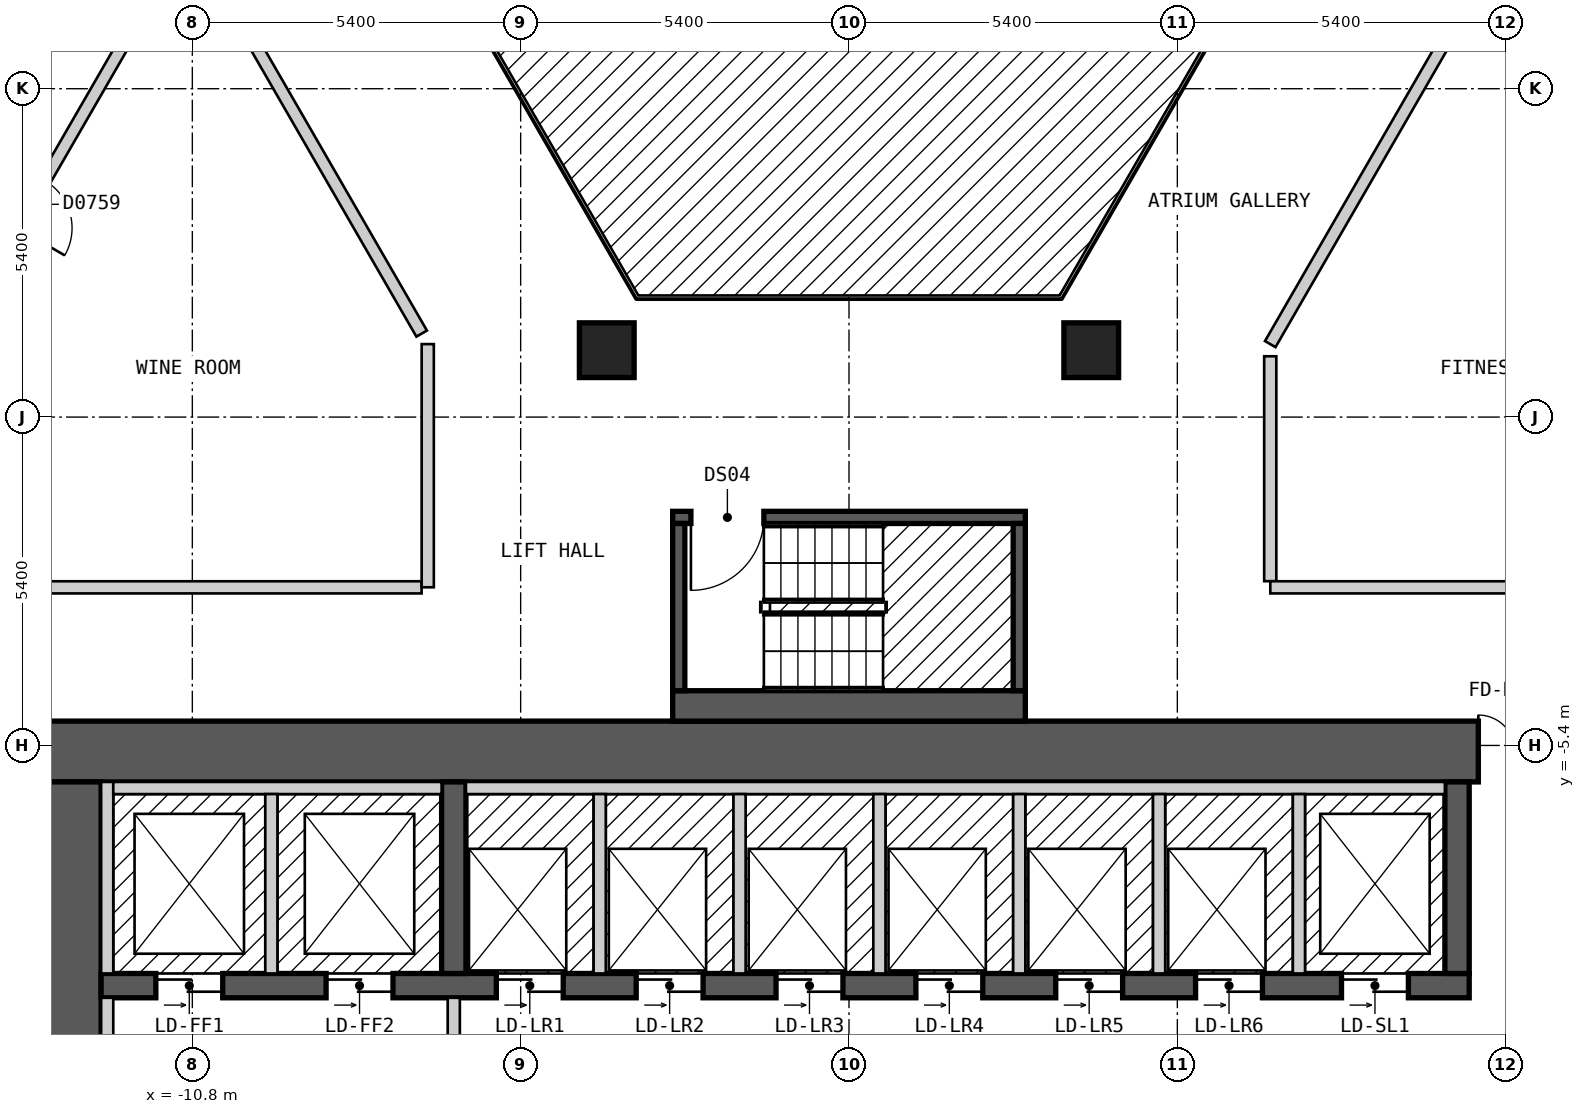
"""IFC4 building model, lengths in metres.
Left out: names, types, materials, properties, quantities, classifications, styles, units other than length and angle.
Written with IfcOpenShell. Run it as: python <this file> out.ifc"""

import sys

from ifc_helpers import new_model, si_unit, direction, frame, frame_2d, origin, origin_2d, place, context, subcontext, project, spatial, rectangle, extrude, element, fill, save


model = new_model("IFC4")
c1 = context("Model", 3, precision=1e-05, world=origin(), true_north=direction((0.0, 1.0)))
c2 = subcontext(c1, "Body", "Model", "MODEL_VIEW")
j1 = project(units=[si_unit("LENGTHUNIT", "METRE"), si_unit("PLANEANGLEUNIT", "RADIAN")], contexts=[c1])
p1 = place(None, origin())
s1 = spatial("IfcSite", under=j1, at=p1, CompositionType="ELEMENT")
p2 = place(p1, origin())
s2 = spatial("IfcBuilding", under=s1, at=p2, CompositionType="ELEMENT")
p3 = place(p2, frame((0.0, 0.0, 105.0)))
s3 = spatial("IfcBuildingStorey", under=s2, at=p3, CompositionType="ELEMENT", Elevation=105.0)
for number, where, z_axis, x_axis in (
    (1, (3.984, 1.1, 0.0), (0.0, 0.0, 1.0), (1.0, 0.0, 0.0)),
    (2, (-3.984, 1.1, 0.0), (0.0, 0.0, 1.0), (1.0, 0.0, 0.0)),
):
    element("IfcColumn", number, at=place(p3, frame(where, z_axis=z_axis, x_axis=x_axis)), inside=s3, PredefinedType="COLUMN", context=c2, shape_type="SweptSolid", body=[
        extrude(rectangle(XDim=0.9, YDim=0.9, at=origin_2d()), origin(), (0.0, 0.0, 1.0), 3.0),
    ])
p4 = place(p3, frame((-13.3, -5.5, 0.0), z_axis=(0.0, 0.0, 1.0), x_axis=(1.0, 0.0, 0.0)))
e3 = element("IfcWall", 3, at=p4, inside=s3, PredefinedType="SHEAR", context=c2, shape_type="SweptSolid", body=[
    extrude(rectangle(XDim=26.6, YDim=1.0, at=frame_2d((13.3, 0.0))), origin(), (0.0, 0.0, 1.0), 2.6),
])
p5 = place(p4, frame((23.65, 0.0, 0.0)))
e4 = element("IfcOpeningElement", 4, at=p5, cuts=e3, PredefinedType="OPENING", context=c2, shape_type="SweptSolid", body=[
    extrude(rectangle(XDim=1.2, YDim=2.1, at=frame_2d((0.6, 1.05))), frame((0.0, 0.51, 0.0), z_axis=(0.0, -1.0, 0.0), x_axis=(1.0, 0.0, 0.0)), (0.0, 0.0, 1.0), 1.02),
])
p6 = place(p3, frame((-12.8, -18.0, 0.0), z_axis=(0.0, 0.0, 1.0), x_axis=(0.0, 1.0, 0.0)))
e5 = element("IfcWall", 5, at=p6, inside=s3, PredefinedType="SHEAR", context=c2, shape_type="SweptSolid", body=[
    extrude(rectangle(XDim=12.0, YDim=1.0, at=frame_2d((6.0, 0.0))), origin(), (0.0, 0.0, 1.0), 2.6),
])
p7 = place(p6, frame((3.8, 0.0, 0.0)))
e6 = element("IfcOpeningElement", 6, at=p7, cuts=e5, PredefinedType="OPENING", context=c2, shape_type="SweptSolid", body=[
    extrude(rectangle(XDim=1.2, YDim=2.1, at=frame_2d((0.6, 1.05))), frame((0.0, 0.51, 0.0), z_axis=(0.0, -1.0, 0.0), x_axis=(1.0, 0.0, 0.0)), (0.0, 0.0, 1.0), 1.02),
])
p8 = place(p3, frame((-12.3, -9.35, 0.0), z_axis=(0.0, 0.0, 1.0), x_axis=(1.0, 0.0, 0.0)))
e7 = element("IfcWall", 7, at=p8, inside=s3, PredefinedType="SHEAR", context=c2, shape_type="SweptSolid", body=[
    extrude(rectangle(XDim=22.5, YDim=0.4, at=frame_2d((11.25, 0.0))), origin(), (0.0, 0.0, 1.0), 2.6),
])
p9 = place(p8, frame((0.9, 0.0, 0.0)))
e8 = element("IfcOpeningElement", 8, at=p9, cuts=e7, PredefinedType="OPENING", context=c2, shape_type="SweptSolid", body=[
    extrude(rectangle(XDim=1.1, YDim=2.1, at=frame_2d((0.55, 1.05))), frame((0.0, 0.21, 0.0), z_axis=(0.0, -1.0, 0.0), x_axis=(1.0, 0.0, 0.0)), (0.0, 0.0, 1.0), 0.42),
])
p10 = place(p8, frame((3.7, 0.0, 0.0)))
e9 = element("IfcOpeningElement", 9, at=p10, cuts=e7, PredefinedType="OPENING", context=c2, shape_type="SweptSolid", body=[
    extrude(rectangle(XDim=1.1, YDim=2.1, at=frame_2d((0.55, 1.05))), frame((0.0, 0.21, 0.0), z_axis=(0.0, -1.0, 0.0), x_axis=(1.0, 0.0, 0.0)), (0.0, 0.0, 1.0), 0.42),
])
p11 = place(p8, frame((6.5, 0.0, 0.0)))
e10 = element("IfcOpeningElement", 10, at=p11, cuts=e7, PredefinedType="OPENING", context=c2, shape_type="SweptSolid", body=[
    extrude(rectangle(XDim=1.1, YDim=2.1, at=frame_2d((0.55, 1.05))), frame((0.0, 0.21, 0.0), z_axis=(0.0, -1.0, 0.0), x_axis=(1.0, 0.0, 0.0)), (0.0, 0.0, 1.0), 0.42),
])
p12 = place(p8, frame((8.8, 0.0, 0.0)))
e11 = element("IfcOpeningElement", 11, at=p12, cuts=e7, PredefinedType="OPENING", context=c2, shape_type="SweptSolid", body=[
    extrude(rectangle(XDim=1.1, YDim=2.1, at=frame_2d((0.55, 1.05))), frame((0.0, 0.21, 0.0), z_axis=(0.0, -1.0, 0.0), x_axis=(1.0, 0.0, 0.0)), (0.0, 0.0, 1.0), 0.42),
])
p13 = place(p8, frame((11.1, 0.0, 0.0)))
e12 = element("IfcOpeningElement", 12, at=p13, cuts=e7, PredefinedType="OPENING", context=c2, shape_type="SweptSolid", body=[
    extrude(rectangle(XDim=1.1, YDim=2.1, at=frame_2d((0.55, 1.05))), frame((0.0, 0.21, 0.0), z_axis=(0.0, -1.0, 0.0), x_axis=(1.0, 0.0, 0.0)), (0.0, 0.0, 1.0), 0.42),
])
p14 = place(p8, frame((13.4, 0.0, 0.0)))
e13 = element("IfcOpeningElement", 13, at=p14, cuts=e7, PredefinedType="OPENING", context=c2, shape_type="SweptSolid", body=[
    extrude(rectangle(XDim=1.1, YDim=2.1, at=frame_2d((0.55, 1.05))), frame((0.0, 0.21, 0.0), z_axis=(0.0, -1.0, 0.0), x_axis=(1.0, 0.0, 0.0)), (0.0, 0.0, 1.0), 0.42),
])
p15 = place(p8, frame((15.7, 0.0, 0.0)))
e14 = element("IfcOpeningElement", 14, at=p15, cuts=e7, PredefinedType="OPENING", context=c2, shape_type="SweptSolid", body=[
    extrude(rectangle(XDim=1.1, YDim=2.1, at=frame_2d((0.55, 1.05))), frame((0.0, 0.21, 0.0), z_axis=(0.0, -1.0, 0.0), x_axis=(1.0, 0.0, 0.0)), (0.0, 0.0, 1.0), 0.42),
])
p16 = place(p8, frame((18.0, 0.0, 0.0)))
e15 = element("IfcOpeningElement", 15, at=p16, cuts=e7, PredefinedType="OPENING", context=c2, shape_type="SweptSolid", body=[
    extrude(rectangle(XDim=1.1, YDim=2.1, at=frame_2d((0.55, 1.05))), frame((0.0, 0.21, 0.0), z_axis=(0.0, -1.0, 0.0), x_axis=(1.0, 0.0, 0.0)), (0.0, 0.0, 1.0), 0.42),
])
p17 = place(p8, frame((20.4, 0.0, 0.0)))
e16 = element("IfcOpeningElement", 16, at=p17, cuts=e7, PredefinedType="OPENING", context=c2, shape_type="SweptSolid", body=[
    extrude(rectangle(XDim=1.1, YDim=2.1, at=frame_2d((0.55, 1.05))), frame((0.0, 0.21, 0.0), z_axis=(0.0, -1.0, 0.0), x_axis=(1.0, 0.0, 0.0)), (0.0, 0.0, 1.0), 0.42),
])
for number, where, z_axis, x_axis in (
    (17, (-6.5, -9.15, 0.0), (0.0, 0.0, 1.0), (0.0, 1.0, 0.0)),
    (18, (10.0, -9.15, 0.0), (0.0, 0.0, 1.0), (0.0, 1.0, 0.0)),
):
    element("IfcWall", number, at=place(p3, frame(where, z_axis=z_axis, x_axis=x_axis)), inside=s3, PredefinedType="SHEAR", context=c2, shape_type="SweptSolid", body=[
        extrude(rectangle(XDim=3.15, YDim=0.4, at=frame_2d((1.575, 0.0))), origin(), (0.0, 0.0, 1.0), 2.6),
    ])
p18 = place(p3, frame((-2.9, -4.75, 0.0), z_axis=(0.0, 0.0, 1.0), x_axis=(1.0, 0.0, 0.0)))
e19 = element("IfcWall", 19, at=p18, inside=s3, PredefinedType="SOLIDWALL", context=c2, shape_type="SweptSolid", body=[
    extrude(rectangle(XDim=5.8, YDim=0.5, at=frame_2d((2.9, 0.0))), origin(), (0.0, 0.0, 1.0), 2.6),
])
p19 = place(p3, frame((-2.9, -1.65, 0.0), z_axis=(0.0, 0.0, 1.0), x_axis=(1.0, 0.0, 0.0)))
e20 = element("IfcWall", 20, at=p19, inside=s3, PredefinedType="SOLIDWALL", context=c2, shape_type="SweptSolid", body=[
    extrude(rectangle(XDim=5.8, YDim=0.2, at=frame_2d((2.9, 0.0))), origin(), (0.0, 0.0, 1.0), 2.6),
])
p20 = place(p19, frame((0.3, 0.0, 0.0)))
e21 = element("IfcOpeningElement", 21, at=p20, cuts=e20, PredefinedType="OPENING", context=c2, shape_type="SweptSolid", body=[
    extrude(rectangle(XDim=1.2, YDim=2.1, at=frame_2d((0.6, 1.05))), frame((0.0, 0.11, 0.0), z_axis=(0.0, -1.0, 0.0), x_axis=(1.0, 0.0, 0.0)), (0.0, 0.0, 1.0), 0.22),
])
for number, where, z_axis, x_axis in (
    (22, (-2.8, -4.5, 0.0), (0.0, 0.0, 1.0), (0.0, 1.0, 0.0)),
    (23, (2.8, -4.5, 0.0), (0.0, 0.0, 1.0), (0.0, 1.0, 0.0)),
):
    element("IfcWall", number, at=place(p3, frame(where, z_axis=z_axis, x_axis=x_axis)), inside=s3, PredefinedType="SOLIDWALL", context=c2, shape_type="SweptSolid", body=[
        extrude(rectangle(XDim=2.75, YDim=0.2, at=frame_2d((1.375, 0.0))), origin(), (0.0, 0.0, 1.0), 2.6),
    ])
p21 = place(p3, frame((-10.796, 7.899, 0.0), z_axis=(0.0, 0.0, 1.0), x_axis=(0.500010383074, -0.866019409031, 0.0)))
e24 = element("IfcWall", 24, at=p21, inside=s3, PredefinedType="PARTITIONING", context=c2, shape_type="SweptSolid", body=[
    extrude(rectangle(XDim=7.535, YDim=0.2, at=frame_2d((3.768, 0.0))), origin(), (0.0, 0.0, 1.0), 2.6),
])
p22 = place(p3, frame((8.488, 16.5, 0.0), z_axis=(0.0, 0.0, 1.0), x_axis=(0.499986836607, -0.86603300354, 0.0)))
e25 = element("IfcWall", 25, at=p22, inside=s3, PredefinedType="PARTITIONING", context=c2, shape_type="SweptSolid", body=[
    extrude(rectangle(XDim=20.09, YDim=0.2, at=frame_2d((10.045, 0.0))), origin(), (0.0, 0.0, 1.0), 2.6),
])
p23 = place(p22, frame((14.569, 0.0, 0.0)))
e26 = element("IfcOpeningElement", 26, at=p23, cuts=e25, PredefinedType="OPENING", context=c2, shape_type="SweptSolid", body=[
    extrude(rectangle(XDim=1.0, YDim=2.1, at=frame_2d((0.5, 1.05))), frame((0.0, 0.11, 0.0), z_axis=(0.0, -1.0, 0.0), x_axis=(1.0, 0.0, 0.0)), (0.0, 0.0, 1.0), 0.22),
])
p24 = place(p22, frame((4.547, 0.0, 0.0)))
e27 = element("IfcOpeningElement", 27, at=p24, cuts=e25, PredefinedType="OPENING", context=c2, shape_type="SweptSolid", body=[
    extrude(rectangle(XDim=1.0, YDim=2.1, at=frame_2d((0.5, 1.05))), frame((0.0, 0.11, 0.0), z_axis=(0.0, -1.0, 0.0), x_axis=(1.0, 0.0, 0.0)), (0.0, 0.0, 1.0), 0.22),
])
p25 = place(p3, frame((6.928, 1.0, 0.0), z_axis=(0.0, 0.0, 1.0), x_axis=(0.0, -1.0, 0.0)))
e28 = element("IfcWall", 28, at=p25, inside=s3, PredefinedType="PARTITIONING", context=c2, shape_type="SweptSolid", body=[
    extrude(rectangle(XDim=3.699, YDim=0.2, at=frame_2d((1.85, 0.0))), origin(), (0.0, 0.0, 1.0), 2.6),
])
p26 = place(p3, frame((-15.011, -2.8, 0.0), z_axis=(0.0, 0.0, 1.0), x_axis=(1.0, 0.0, 0.0)))
e29 = element("IfcWall", 29, at=p26, inside=s3, PredefinedType="PARTITIONING", context=c2, shape_type="SweptSolid", body=[
    extrude(rectangle(XDim=7.982, YDim=0.2, at=frame_2d((3.991, 0.0))), origin(), (0.0, 0.0, 1.0), 2.6),
])
p27 = place(p3, frame((6.929, -2.8, 0.0), z_axis=(0.0, 0.0, 1.0), x_axis=(1.0, 0.0, 0.0)))
e30 = element("IfcWall", 30, at=p27, inside=s3, PredefinedType="PARTITIONING", context=c2, shape_type="SweptSolid", body=[
    extrude(rectangle(XDim=7.966, YDim=0.2, at=frame_2d((3.983, 0.0))), origin(), (0.0, 0.0, 1.0), 2.6),
])
p28 = place(p3, frame((6.928, 1.2, 0.0), z_axis=(0.0, 0.0, 1.0), x_axis=(0.500055327065, 0.865993458332, 0.0)))
e31 = element("IfcWall", 31, at=p28, inside=s3, PredefinedType="PARTITIONING", context=c2, shape_type="SweptSolid", body=[
    extrude(rectangle(XDim=7.851, YDim=0.2, at=frame_2d((3.926, 0.0))), origin(), (0.0, 0.0, 1.0), 2.6),
])
p29 = place(p3, frame((-16.05, -1.0, 0.0), z_axis=(0.0, 0.0, 1.0), x_axis=(0.499962449088, 0.866047082728, 0.0)))
e32 = element("IfcWall", 32, at=p29, inside=s3, PredefinedType="PARTITIONING", context=c2, shape_type="SweptSolid", body=[
    extrude(rectangle(XDim=10.391, YDim=0.2, at=frame_2d((5.195, 0.0))), origin(), (0.0, 0.0, 1.0), 2.6),
])
p30 = place(p29, frame((4.745, 0.0, 0.0)))
e33 = element("IfcOpeningElement", 33, at=p30, cuts=e32, PredefinedType="OPENING", context=c2, shape_type="SweptSolid", body=[
    extrude(rectangle(XDim=0.9, YDim=2.1, at=frame_2d((0.45, 1.05))), frame((0.0, 0.11, 0.0), z_axis=(0.0, -1.0, 0.0), x_axis=(1.0, 0.0, 0.0)), (0.0, 0.0, 1.0), 0.22),
])
p31 = place(p3, frame((-18.533, -0.901, 0.0), z_axis=(0.0, 0.0, 1.0), x_axis=(0.499981198768, 0.866036258409, 0.0)))
e34 = element("IfcWall", 34, at=p31, inside=s3, PredefinedType="PARTITIONING", context=c2, shape_type="SweptSolid", body=[
    extrude(rectangle(XDim=20.093, YDim=0.2, at=frame_2d((10.046, 0.0))), origin(), (0.0, 0.0, 1.0), 2.6),
])
p32 = place(p31, frame((14.57, 0.0, 0.0)))
e35 = element("IfcOpeningElement", 35, at=p32, cuts=e34, PredefinedType="OPENING", context=c2, shape_type="SweptSolid", body=[
    extrude(rectangle(XDim=1.0, YDim=2.1, at=frame_2d((0.5, 1.05))), frame((0.0, 0.11, 0.0), z_axis=(0.0, -1.0, 0.0), x_axis=(1.0, 0.0, 0.0)), (0.0, 0.0, 1.0), 0.22),
])
p33 = place(p31, frame((4.523, 0.0, 0.0)))
e36 = element("IfcOpeningElement", 36, at=p33, cuts=e34, PredefinedType="OPENING", context=c2, shape_type="SweptSolid", body=[
    extrude(rectangle(XDim=1.0, YDim=2.1, at=frame_2d((0.5, 1.05))), frame((0.0, 0.11, 0.0), z_axis=(0.0, -1.0, 0.0), x_axis=(1.0, 0.0, 0.0)), (0.0, 0.0, 1.0), 0.22),
])
p34 = place(p3, frame((-6.928, -2.799, 0.0), z_axis=(0.0, 0.0, 1.0), x_axis=(0.0, 1.0, 0.0)))
e37 = element("IfcWall", 37, at=p34, inside=s3, PredefinedType="PARTITIONING", context=c2, shape_type="SweptSolid", body=[
    extrude(rectangle(XDim=3.999, YDim=0.2, at=frame_2d((2.0, 0.0))), origin(), (0.0, 0.0, 1.0), 2.6),
])
p35 = place(p3, frame((-12.2, -13.0, 0.0), z_axis=(0.0, 0.0, 1.0), x_axis=(0.0, 1.0, 0.0)))
e38 = element("IfcWall", 38, at=p35, inside=s3, PredefinedType="PARTITIONING", context=c2, shape_type="SweptSolid", body=[
    extrude(rectangle(XDim=3.45, YDim=0.2, at=frame_2d((1.725, 0.0))), origin(), (0.0, 0.0, 1.0), 2.6),
])
p36 = place(p3, frame((-12.2, -9.15, 0.0), z_axis=(0.0, 0.0, 1.0), x_axis=(0.0, 1.0, 0.0)))
e39 = element("IfcWall", 39, at=p36, inside=s3, PredefinedType="SOLIDWALL", context=c2, shape_type="SweptSolid", body=[
    extrude(rectangle(XDim=3.15, YDim=0.2, at=frame_2d((1.575, 0.0))), origin(), (0.0, 0.0, 1.0), 2.6),
])
p37 = place(p3, frame((-12.1, -6.1, 0.0), z_axis=(0.0, 0.0, 1.0), x_axis=(1.0, 0.0, 0.0)))
e40 = element("IfcWall", 40, at=p37, inside=s3, PredefinedType="SOLIDWALL", context=c2, shape_type="SweptSolid", body=[
    extrude(rectangle(XDim=5.4, YDim=0.2, at=frame_2d((2.7, 0.0))), origin(), (0.0, 0.0, 1.0), 2.6),
])
p38 = place(p3, frame((-9.5, -9.15, 0.0), z_axis=(0.0, 0.0, 1.0), x_axis=(0.0, 1.0, 0.0)))
e41 = element("IfcWall", 41, at=p38, inside=s3, PredefinedType="SOLIDWALL", context=c2, shape_type="SweptSolid", body=[
    extrude(rectangle(XDim=2.95, YDim=0.2, at=frame_2d((1.475, 0.0))), origin(), (0.0, 0.0, 1.0), 2.6),
])
p39 = place(p3, frame((-6.5, -14.45, 0.0), z_axis=(0.0, 0.0, 1.0), x_axis=(0.0, 1.0, 0.0)))
e42 = element("IfcWall", 42, at=p39, inside=s3, PredefinedType="PARTITIONING", context=c2, shape_type="SweptSolid", body=[
    extrude(rectangle(XDim=4.9, YDim=0.2, at=frame_2d((2.45, 0.0))), origin(), (0.0, 0.0, 1.0), 2.6),
])
p40 = place(p39, frame((3.15, 0.0, 0.0), z_axis=(0.0, 0.0, 1.0), x_axis=(-1.0, 0.0, 0.0)))
e43 = element("IfcOpeningElement", 43, at=p40, cuts=e42, PredefinedType="OPENING", context=c2, shape_type="SweptSolid", body=[
    extrude(rectangle(XDim=1.4, YDim=2.1, at=frame_2d((0.7, 1.05))), frame((0.0, 0.11, 0.0), z_axis=(0.0, -1.0, 0.0), x_axis=(1.0, 0.0, 0.0)), (0.0, 0.0, 1.0), 0.22),
])
p41 = place(p3, frame((-6.3, -6.1, 0.0), z_axis=(0.0, 0.0, 1.0), x_axis=(1.0, 0.0, 0.0)))
e44 = element("IfcWall", 44, at=p41, inside=s3, PredefinedType="SOLIDWALL", context=c2, shape_type="SweptSolid", body=[
    extrude(rectangle(XDim=16.1, YDim=0.2, at=frame_2d((8.05, 0.0))), origin(), (0.0, 0.0, 1.0), 2.6),
])
for number, where, z_axis, x_axis in (
    (45, (-4.1, -9.15, 0.0), (0.0, 0.0, 1.0), (0.0, 1.0, 0.0)),
    (46, (-1.8, -9.15, 0.0), (0.0, 0.0, 1.0), (0.0, 1.0, 0.0)),
    (47, (0.5, -9.15, 0.0), (0.0, 0.0, 1.0), (0.0, 1.0, 0.0)),
    (48, (2.8, -9.15, 0.0), (0.0, 0.0, 1.0), (0.0, 1.0, 0.0)),
    (49, (5.1, -9.15, 0.0), (0.0, 0.0, 1.0), (0.0, 1.0, 0.0)),
    (50, (7.4, -9.15, 0.0), (0.0, 0.0, 1.0), (0.0, 1.0, 0.0)),
):
    element("IfcWall", number, at=place(p3, frame(where, z_axis=z_axis, x_axis=x_axis)), inside=s3, PredefinedType="SOLIDWALL", context=c2, shape_type="SweptSolid", body=[
        extrude(rectangle(XDim=2.95, YDim=0.2, at=frame_2d((1.475, 0.0))), origin(), (0.0, 0.0, 1.0), 2.6),
    ])
p42 = place(p20, origin())
e51 = element("IfcDoor", 51, at=p42, inside=s3, OperationType="SINGLE_SWING_LEFT", PredefinedType="DOOR", context=c2, shape_type="SweptSolid", body=[
    extrude(rectangle(XDim=1.2, YDim=2.1, at=frame_2d((0.6, 1.05))), frame((0.0, 0.025, 0.0), z_axis=(0.0, -1.0, 0.0), x_axis=(1.0, 0.0, 0.0)), (0.0, 0.0, 1.0), 0.05),
])
fill(e21, e51)
p43 = place(p9, origin())
e52 = element("IfcDoor", 52, at=p43, inside=s3, OperationType="DOUBLE_DOOR_SLIDING", PredefinedType="DOOR", context=c2, shape_type="SweptSolid", body=[
    extrude(rectangle(XDim=1.1, YDim=2.1, at=frame_2d((0.55, 1.05))), frame((0.0, 0.025, 0.0), z_axis=(0.0, -1.0, 0.0), x_axis=(1.0, 0.0, 0.0)), (0.0, 0.0, 1.0), 0.05),
])
fill(e8, e52)
p44 = place(p10, origin())
e53 = element("IfcDoor", 53, at=p44, inside=s3, OperationType="DOUBLE_DOOR_SLIDING", PredefinedType="DOOR", context=c2, shape_type="SweptSolid", body=[
    extrude(rectangle(XDim=1.1, YDim=2.1, at=frame_2d((0.55, 1.05))), frame((0.0, 0.025, 0.0), z_axis=(0.0, -1.0, 0.0), x_axis=(1.0, 0.0, 0.0)), (0.0, 0.0, 1.0), 0.05),
])
fill(e9, e53)
p45 = place(p11, origin())
e54 = element("IfcDoor", 54, at=p45, inside=s3, OperationType="DOUBLE_DOOR_SLIDING", PredefinedType="DOOR", context=c2, shape_type="SweptSolid", body=[
    extrude(rectangle(XDim=1.1, YDim=2.1, at=frame_2d((0.55, 1.05))), frame((0.0, 0.025, 0.0), z_axis=(0.0, -1.0, 0.0), x_axis=(1.0, 0.0, 0.0)), (0.0, 0.0, 1.0), 0.05),
])
fill(e10, e54)
p46 = place(p12, origin())
e55 = element("IfcDoor", 55, at=p46, inside=s3, OperationType="DOUBLE_DOOR_SLIDING", PredefinedType="DOOR", context=c2, shape_type="SweptSolid", body=[
    extrude(rectangle(XDim=1.1, YDim=2.1, at=frame_2d((0.55, 1.05))), frame((0.0, 0.025, 0.0), z_axis=(0.0, -1.0, 0.0), x_axis=(1.0, 0.0, 0.0)), (0.0, 0.0, 1.0), 0.05),
])
fill(e11, e55)
p47 = place(p13, origin())
e56 = element("IfcDoor", 56, at=p47, inside=s3, OperationType="DOUBLE_DOOR_SLIDING", PredefinedType="DOOR", context=c2, shape_type="SweptSolid", body=[
    extrude(rectangle(XDim=1.1, YDim=2.1, at=frame_2d((0.55, 1.05))), frame((0.0, 0.025, 0.0), z_axis=(0.0, -1.0, 0.0), x_axis=(1.0, 0.0, 0.0)), (0.0, 0.0, 1.0), 0.05),
])
fill(e12, e56)
p48 = place(p14, origin())
e57 = element("IfcDoor", 57, at=p48, inside=s3, OperationType="DOUBLE_DOOR_SLIDING", PredefinedType="DOOR", context=c2, shape_type="SweptSolid", body=[
    extrude(rectangle(XDim=1.1, YDim=2.1, at=frame_2d((0.55, 1.05))), frame((0.0, 0.025, 0.0), z_axis=(0.0, -1.0, 0.0), x_axis=(1.0, 0.0, 0.0)), (0.0, 0.0, 1.0), 0.05),
])
fill(e13, e57)
p49 = place(p15, origin())
e58 = element("IfcDoor", 58, at=p49, inside=s3, OperationType="DOUBLE_DOOR_SLIDING", PredefinedType="DOOR", context=c2, shape_type="SweptSolid", body=[
    extrude(rectangle(XDim=1.1, YDim=2.1, at=frame_2d((0.55, 1.05))), frame((0.0, 0.025, 0.0), z_axis=(0.0, -1.0, 0.0), x_axis=(1.0, 0.0, 0.0)), (0.0, 0.0, 1.0), 0.05),
])
fill(e14, e58)
p50 = place(p16, origin())
e59 = element("IfcDoor", 59, at=p50, inside=s3, OperationType="DOUBLE_DOOR_SLIDING", PredefinedType="DOOR", context=c2, shape_type="SweptSolid", body=[
    extrude(rectangle(XDim=1.1, YDim=2.1, at=frame_2d((0.55, 1.05))), frame((0.0, 0.025, 0.0), z_axis=(0.0, -1.0, 0.0), x_axis=(1.0, 0.0, 0.0)), (0.0, 0.0, 1.0), 0.05),
])
fill(e15, e59)
p51 = place(p17, origin())
e60 = element("IfcDoor", 60, at=p51, inside=s3, OperationType="DOUBLE_DOOR_SLIDING", PredefinedType="DOOR", context=c2, shape_type="SweptSolid", body=[
    extrude(rectangle(XDim=1.1, YDim=2.1, at=frame_2d((0.55, 1.05))), frame((0.0, 0.025, 0.0), z_axis=(0.0, -1.0, 0.0), x_axis=(1.0, 0.0, 0.0)), (0.0, 0.0, 1.0), 0.05),
])
fill(e16, e60)
p52 = place(p5, origin())
e61 = element("IfcDoor", 61, at=p52, inside=s3, OperationType="DOUBLE_DOOR_SINGLE_SWING", PredefinedType="DOOR", context=c2, shape_type="SweptSolid", body=[
    extrude(rectangle(XDim=1.2, YDim=2.1, at=frame_2d((0.6, 1.05))), frame((0.0, 0.025, 0.0), z_axis=(0.0, -1.0, 0.0), x_axis=(1.0, 0.0, 0.0)), (0.0, 0.0, 1.0), 0.05),
])
fill(e4, e61)
save(model, sys.argv[1])
